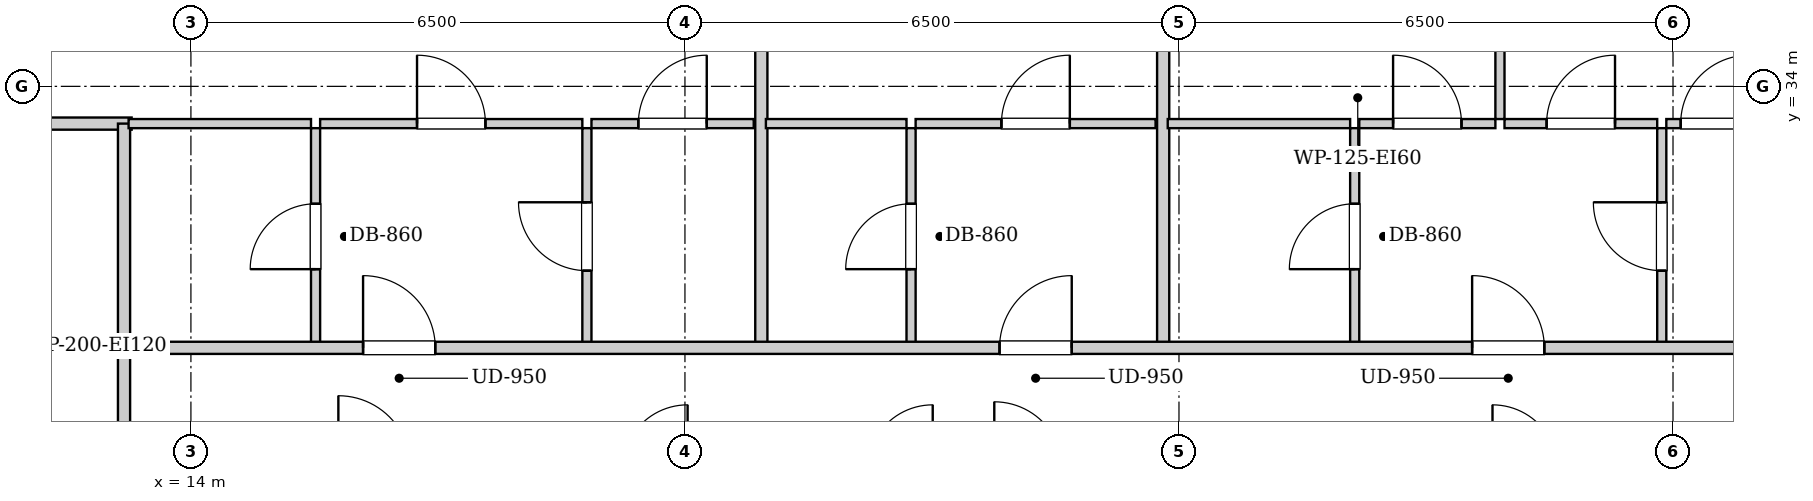
"""IFC4 building model, lengths in metres.
Left out: names, types, materials, properties, quantities, classifications, styles, units other than length and angle.
Written with IfcOpenShell. Run it as: python <this file> out.ifc"""

import sys

from ifc_helpers import new_model, si_unit, direction, frame, frame_2d, origin, place, context, subcontext, project, spatial, rectangle, extrude, element, fill, save


model = new_model("IFC4")
c1 = context("Model", 3, precision=1e-05, world=origin(), true_north=direction((0.0, 1.0)))
c2 = subcontext(c1, "Body", "Model", "MODEL_VIEW")
j1 = project(units=[si_unit("LENGTHUNIT", "METRE"), si_unit("PLANEANGLEUNIT", "RADIAN")], contexts=[c1])
p1 = place(None, origin())
s1 = spatial("IfcSite", under=j1, at=p1, CompositionType="ELEMENT")
p2 = place(p1, origin())
s2 = spatial("IfcBuilding", under=s1, at=p2, CompositionType="ELEMENT")
p3 = place(p2, frame((0.0, 0.0, 187.6)))
s3 = spatial("IfcBuildingStorey", under=s2, at=p3, CompositionType="ELEMENT", Elevation=187.6)
p4 = place(p3, frame((13.12, 28.98, 0.0), z_axis=(0.0, 0.0, 1.0), x_axis=(0.0, 1.0, 0.0)))
e1 = element("IfcWall", 1, at=p4, inside=s3, PredefinedType="PARTITIONING", context=c2, shape_type="SweptSolid", body=[
    extrude(rectangle(XDim=1.58, YDim=0.16, at=frame_2d((0.79, 0.0))), origin(), (0.0, 0.0, 1.0), 3.04),
])
p5 = place(p3, frame((10.88, 33.51, 0.0), z_axis=(0.0, 0.0, 1.0), x_axis=(1.0, 0.0, 0.0)))
e2 = element("IfcWall", 2, at=p5, inside=s3, PredefinedType="PARTITIONING", context=c2, shape_type="SweptSolid", body=[
    extrude(rectangle(XDim=2.34, YDim=0.16, at=frame_2d((1.17, 0.0))), origin(), (0.0, 0.0, 1.0), 3.04),
])
p6 = place(p3, frame((13.12, 30.6, 0.0), z_axis=(0.0, 0.0, 1.0), x_axis=(0.0, 1.0, 0.0)))
e3 = element("IfcWall", 3, at=p6, inside=s3, PredefinedType="PARTITIONING", context=c2, shape_type="SweptSolid", body=[
    extrude(rectangle(XDim=2.91, YDim=0.16, at=frame_2d((1.455, 0.0))), origin(), (0.0, 0.0, 1.0), 3.04),
])
p7 = place(p3, frame((15.64, 30.6, 0.0), z_axis=(0.0, 0.0, 1.0), x_axis=(0.0, 1.0, 0.0)))
e4 = element("IfcWall", 4, at=p7, inside=s3, PredefinedType="PARTITIONING", context=c2, shape_type="SweptSolid", body=[
    extrude(rectangle(XDim=2.85, YDim=0.12, at=frame_2d((1.425, 0.0))), origin(), (0.0, 0.0, 1.0), 3.04),
])
p8 = place(p7, frame((0.995, 0.0, 0.0)))
e5 = element("IfcOpeningElement", 5, at=p8, cuts=e4, PredefinedType="OPENING", context=c2, shape_type="SweptSolid", body=[
    extrude(rectangle(XDim=0.86, YDim=2.05, at=frame_2d((0.43, 1.025))), frame((0.0, 0.07, 0.0), z_axis=(0.0, -1.0, 0.0), x_axis=(1.0, 0.0, 0.0)), (0.0, 0.0, 1.0), 0.14),
])
p9 = place(p3, frame((13.18, 33.51, 0.0), z_axis=(0.0, 0.0, 1.0), x_axis=(1.0, 0.0, 0.0)))
e6 = element("IfcWall", 6, at=p9, inside=s3, PredefinedType="PARTITIONING", context=c2, shape_type="SweptSolid", body=[
    extrude(rectangle(XDim=2.4, YDim=0.12, at=frame_2d((1.2, 0.0))), origin(), (0.0, 0.0, 1.0), 3.04),
])
p10 = place(p3, frame((19.21, 30.6, 0.0), z_axis=(0.0, 0.0, 1.0), x_axis=(0.0, 1.0, 0.0)))
e7 = element("IfcWall", 7, at=p10, inside=s3, PredefinedType="PARTITIONING", context=c2, shape_type="SweptSolid", body=[
    extrude(rectangle(XDim=2.85, YDim=0.12, at=frame_2d((1.425, 0.0))), origin(), (0.0, 0.0, 1.0), 3.04),
])
p11 = place(p10, frame((0.975, 0.0, 0.0)))
e8 = element("IfcOpeningElement", 8, at=p11, cuts=e7, PredefinedType="OPENING", context=c2, shape_type="SweptSolid", body=[
    extrude(rectangle(XDim=0.9, YDim=2.05, at=frame_2d((0.45, 1.025))), frame((0.0, 0.07, 0.0), z_axis=(0.0, -1.0, 0.0), x_axis=(1.0, 0.0, 0.0)), (0.0, 0.0, 1.0), 0.14),
])
p12 = place(p3, frame((15.7, 33.51, 0.0), z_axis=(0.0, 0.0, 1.0), x_axis=(1.0, 0.0, 0.0)))
e9 = element("IfcWall", 9, at=p12, inside=s3, PredefinedType="PARTITIONING", context=c2, shape_type="SweptSolid", body=[
    extrude(rectangle(XDim=3.45, YDim=0.12, at=frame_2d((1.725, 0.0))), origin(), (0.0, 0.0, 1.0), 3.04),
])
p13 = place(p12, frame((1.275, 0.0, 0.0)))
e10 = element("IfcOpeningElement", 10, at=p13, cuts=e9, PredefinedType="OPENING", context=c2, shape_type="SweptSolid", body=[
    extrude(rectangle(XDim=0.9, YDim=2.05, at=frame_2d((0.45, 1.025))), frame((0.0, 0.07, 0.0), z_axis=(0.0, -1.0, 0.0), x_axis=(1.0, 0.0, 0.0)), (0.0, 0.0, 1.0), 0.14),
])
p14 = place(p3, frame((19.27, 33.51, 0.0), z_axis=(0.0, 0.0, 1.0), x_axis=(1.0, 0.0, 0.0)))
e11 = element("IfcWall", 11, at=p14, inside=s3, PredefinedType="PARTITIONING", context=c2, shape_type="SweptSolid", body=[
    extrude(rectangle(XDim=2.135, YDim=0.12, at=frame_2d((1.067, 0.0))), origin(), (0.0, 0.0, 1.0), 3.04),
])
p15 = place(p14, frame((0.617, 0.0, 0.0)))
e12 = element("IfcOpeningElement", 12, at=p15, cuts=e11, PredefinedType="OPENING", context=c2, shape_type="SweptSolid", body=[
    extrude(rectangle(XDim=0.9, YDim=2.05, at=frame_2d((0.45, 1.025))), frame((0.0, 0.07, 0.0), z_axis=(0.0, -1.0, 0.0), x_axis=(1.0, 0.0, 0.0)), (0.0, 0.0, 1.0), 0.14),
])
p16 = place(p3, frame((21.505, 30.6, 0.0), z_axis=(0.0, 0.0, 1.0), x_axis=(0.0, 1.0, 0.0)))
e13 = element("IfcWall", 13, at=p16, inside=s3, PredefinedType="PARTITIONING", context=c2, shape_type="SweptSolid", body=[
    extrude(rectangle(XDim=9.32, YDim=0.16, at=frame_2d((4.66, 0.0))), origin(), (0.0, 0.0, 1.0), 3.04),
])
p17 = place(p3, frame((23.475, 30.6, 0.0), z_axis=(0.0, 0.0, 1.0), x_axis=(0.0, 1.0, 0.0)))
e14 = element("IfcWall", 14, at=p17, inside=s3, PredefinedType="PARTITIONING", context=c2, shape_type="SweptSolid", body=[
    extrude(rectangle(XDim=2.85, YDim=0.12, at=frame_2d((1.425, 0.0))), origin(), (0.0, 0.0, 1.0), 3.04),
])
p18 = place(p17, frame((0.995, 0.0, 0.0)))
e15 = element("IfcOpeningElement", 15, at=p18, cuts=e14, PredefinedType="OPENING", context=c2, shape_type="SweptSolid", body=[
    extrude(rectangle(XDim=0.86, YDim=2.05, at=frame_2d((0.43, 1.025))), frame((0.0, 0.07, 0.0), z_axis=(0.0, -1.0, 0.0), x_axis=(1.0, 0.0, 0.0)), (0.0, 0.0, 1.0), 0.14),
])
p19 = place(p3, frame((21.565, 33.51, 0.0), z_axis=(0.0, 0.0, 1.0), x_axis=(1.0, 0.0, 0.0)))
e16 = element("IfcWall", 16, at=p19, inside=s3, PredefinedType="PARTITIONING", context=c2, shape_type="SweptSolid", body=[
    extrude(rectangle(XDim=1.85, YDim=0.12, at=frame_2d((0.925, 0.0))), origin(), (0.0, 0.0, 1.0), 3.04),
])
p20 = place(p3, frame((23.535, 33.51, 0.0), z_axis=(0.0, 0.0, 1.0), x_axis=(1.0, 0.0, 0.0)))
e17 = element("IfcWall", 17, at=p20, inside=s3, PredefinedType="PARTITIONING", context=c2, shape_type="SweptSolid", body=[
    extrude(rectangle(XDim=3.157, YDim=0.12, at=frame_2d((1.579, 0.0))), origin(), (0.0, 0.0, 1.0), 3.04),
])
p21 = place(p20, frame((1.129, 0.0, 0.0)))
e18 = element("IfcOpeningElement", 18, at=p21, cuts=e17, PredefinedType="OPENING", context=c2, shape_type="SweptSolid", body=[
    extrude(rectangle(XDim=0.9, YDim=2.05, at=frame_2d((0.45, 1.025))), frame((0.0, 0.07, 0.0), z_axis=(0.0, -1.0, 0.0), x_axis=(1.0, 0.0, 0.0)), (0.0, 0.0, 1.0), 0.14),
])
p22 = place(p3, frame((26.792, 30.6, 0.0), z_axis=(0.0, 0.0, 1.0), x_axis=(0.0, 1.0, 0.0)))
e19 = element("IfcWall", 19, at=p22, inside=s3, PredefinedType="PARTITIONING", context=c2, shape_type="SweptSolid", body=[
    extrude(rectangle(XDim=9.32, YDim=0.16, at=frame_2d((4.66, 0.0))), origin(), (0.0, 0.0, 1.0), 3.04),
])
p23 = place(p3, frame((29.312, 30.6, 0.0), z_axis=(0.0, 0.0, 1.0), x_axis=(0.0, 1.0, 0.0)))
e20 = element("IfcWall", 20, at=p23, inside=s3, PredefinedType="PARTITIONING", context=c2, shape_type="SweptSolid", body=[
    extrude(rectangle(XDim=2.85, YDim=0.12, at=frame_2d((1.425, 0.0))), origin(), (0.0, 0.0, 1.0), 3.04),
])
p24 = place(p23, frame((0.995, 0.0, 0.0)))
e21 = element("IfcOpeningElement", 21, at=p24, cuts=e20, PredefinedType="OPENING", context=c2, shape_type="SweptSolid", body=[
    extrude(rectangle(XDim=0.86, YDim=2.05, at=frame_2d((0.43, 1.025))), frame((0.0, 0.07, 0.0), z_axis=(0.0, -1.0, 0.0), x_axis=(1.0, 0.0, 0.0)), (0.0, 0.0, 1.0), 0.14),
])
p25 = place(p3, frame((26.852, 33.51, 0.0), z_axis=(0.0, 0.0, 1.0), x_axis=(1.0, 0.0, 0.0)))
e22 = element("IfcWall", 22, at=p25, inside=s3, PredefinedType="PARTITIONING", context=c2, shape_type="SweptSolid", body=[
    extrude(rectangle(XDim=2.4, YDim=0.12, at=frame_2d((1.2, 0.0))), origin(), (0.0, 0.0, 1.0), 3.04),
])
p26 = place(p3, frame((33.352, 30.6, 0.0), z_axis=(0.0, 0.0, 1.0), x_axis=(0.0, 1.0, 0.0)))
e23 = element("IfcWall", 23, at=p26, inside=s3, PredefinedType="PARTITIONING", context=c2, shape_type="SweptSolid", body=[
    extrude(rectangle(XDim=2.85, YDim=0.12, at=frame_2d((1.425, 0.0))), origin(), (0.0, 0.0, 1.0), 3.04),
])
p27 = place(p26, frame((0.975, 0.0, 0.0)))
e24 = element("IfcOpeningElement", 24, at=p27, cuts=e23, PredefinedType="OPENING", context=c2, shape_type="SweptSolid", body=[
    extrude(rectangle(XDim=0.9, YDim=2.05, at=frame_2d((0.45, 1.025))), frame((0.0, 0.07, 0.0), z_axis=(0.0, -1.0, 0.0), x_axis=(1.0, 0.0, 0.0)), (0.0, 0.0, 1.0), 0.14),
])
p28 = place(p3, frame((29.372, 33.51, 0.0), z_axis=(0.0, 0.0, 1.0), x_axis=(1.0, 0.0, 0.0)))
e25 = element("IfcWall", 25, at=p28, inside=s3, PredefinedType="PARTITIONING", context=c2, shape_type="SweptSolid", body=[
    extrude(rectangle(XDim=1.791, YDim=0.12, at=frame_2d((0.896, 0.0))), origin(), (0.0, 0.0, 1.0), 3.04),
])
p29 = place(p28, frame((0.445, 0.0, 0.0)))
e26 = element("IfcOpeningElement", 26, at=p29, cuts=e25, PredefinedType="OPENING", context=c2, shape_type="SweptSolid", body=[
    extrude(rectangle(XDim=0.9, YDim=2.05, at=frame_2d((0.45, 1.025))), frame((0.0, 0.07, 0.0), z_axis=(0.0, -1.0, 0.0), x_axis=(1.0, 0.0, 0.0)), (0.0, 0.0, 1.0), 0.14),
])
p30 = place(p3, frame((31.283, 33.51, 0.0), z_axis=(0.0, 0.0, 1.0), x_axis=(1.0, 0.0, 0.0)))
e27 = element("IfcWall", 27, at=p30, inside=s3, PredefinedType="PARTITIONING", context=c2, shape_type="SweptSolid", body=[
    extrude(rectangle(XDim=2.009, YDim=0.12, at=frame_2d((1.004, 0.0))), origin(), (0.0, 0.0, 1.0), 3.04),
])
p31 = place(p30, frame((0.554, 0.0, 0.0)))
e28 = element("IfcOpeningElement", 28, at=p31, cuts=e27, PredefinedType="OPENING", context=c2, shape_type="SweptSolid", body=[
    extrude(rectangle(XDim=0.9, YDim=2.05, at=frame_2d((0.45, 1.025))), frame((0.0, 0.07, 0.0), z_axis=(0.0, -1.0, 0.0), x_axis=(1.0, 0.0, 0.0)), (0.0, 0.0, 1.0), 0.14),
])
p32 = place(p3, frame((33.412, 33.51, 0.0), z_axis=(0.0, 0.0, 1.0), x_axis=(1.0, 0.0, 0.0)))
e29 = element("IfcWall", 29, at=p32, inside=s3, PredefinedType="PARTITIONING", context=c2, shape_type="SweptSolid", body=[
    extrude(rectangle(XDim=1.278, YDim=0.12, at=frame_2d((0.639, 0.0))), origin(), (0.0, 0.0, 1.0), 3.04),
])
p33 = place(p32, frame((0.189, 0.0, 0.0)))
e30 = element("IfcOpeningElement", 30, at=p33, cuts=e29, PredefinedType="OPENING", context=c2, shape_type="SweptSolid", body=[
    extrude(rectangle(XDim=0.9, YDim=2.05, at=frame_2d((0.45, 1.025))), frame((0.0, 0.07, 0.0), z_axis=(0.0, -1.0, 0.0), x_axis=(1.0, 0.0, 0.0)), (0.0, 0.0, 1.0), 0.14),
])
p34 = place(p3, frame((31.223, 33.57, 0.0), z_axis=(0.0, 0.0, 1.0), x_axis=(0.0, 1.0, 0.0)))
e31 = element("IfcWall", 31, at=p34, inside=s3, PredefinedType="PARTITIONING", context=c2, shape_type="SweptSolid", body=[
    extrude(rectangle(XDim=4.2, YDim=0.12, at=frame_2d((2.1, 0.0))), origin(), (0.0, 0.0, 1.0), 3.04),
])
p35 = place(p34, frame((1.65, 0.0, 0.0)))
e32 = element("IfcOpeningElement", 32, at=p35, cuts=e31, PredefinedType="OPENING", context=c2, shape_type="SweptSolid", body=[
    extrude(rectangle(XDim=0.9, YDim=2.05, at=frame_2d((0.45, 1.025))), frame((0.0, 0.07, 0.0), z_axis=(0.0, -1.0, 0.0), x_axis=(1.0, 0.0, 0.0)), (0.0, 0.0, 1.0), 0.14),
])
p36 = place(p3, frame((13.15, 30.56, 0.0), z_axis=(0.0, 0.0, 1.0), x_axis=(1.0, 0.0, 0.0)))
e33 = element("IfcWall", 33, at=p36, inside=s3, PredefinedType="PARTITIONING", context=c2, shape_type="SweptSolid", body=[
    extrude(rectangle(XDim=24.6, YDim=0.16, at=frame_2d((12.3, 0.0))), origin(), (0.0, 0.0, 1.0), 3.04),
])
p37 = place(p36, frame((3.115, 0.0, 0.0)))
e34 = element("IfcOpeningElement", 34, at=p37, cuts=e33, PredefinedType="OPENING", context=c2, shape_type="SweptSolid", body=[
    extrude(rectangle(XDim=0.95, YDim=2.1, at=frame_2d((0.475, 1.05))), frame((0.0, 0.09, 0.0), z_axis=(0.0, -1.0, 0.0), x_axis=(1.0, 0.0, 0.0)), (0.0, 0.0, 1.0), 0.18),
])
p38 = place(p36, frame((11.489, 0.0, 0.0)))
e35 = element("IfcOpeningElement", 35, at=p38, cuts=e33, PredefinedType="OPENING", context=c2, shape_type="SweptSolid", body=[
    extrude(rectangle(XDim=0.95, YDim=2.1, at=frame_2d((0.475, 1.05))), frame((0.0, 0.09, 0.0), z_axis=(0.0, -1.0, 0.0), x_axis=(1.0, 0.0, 0.0)), (0.0, 0.0, 1.0), 0.18),
])
p39 = place(p36, frame((17.707, 0.0, 0.0)))
e36 = element("IfcOpeningElement", 36, at=p39, cuts=e33, PredefinedType="OPENING", context=c2, shape_type="SweptSolid", body=[
    extrude(rectangle(XDim=0.95, YDim=2.1, at=frame_2d((0.475, 1.05))), frame((0.0, 0.09, 0.0), z_axis=(0.0, -1.0, 0.0), x_axis=(1.0, 0.0, 0.0)), (0.0, 0.0, 1.0), 0.18),
])
p40 = place(p8, origin())
e37 = element("IfcDoor", 37, at=p40, inside=s3, OperationType="SINGLE_SWING_LEFT", PredefinedType="DOOR", context=c2, shape_type="SweptSolid", body=[
    extrude(rectangle(XDim=0.86, YDim=2.05, at=frame_2d((0.43, 1.025))), frame((0.0, 0.025, 0.0), z_axis=(0.0, -1.0, 0.0), x_axis=(1.0, 0.0, 0.0)), (0.0, 0.0, 1.0), 0.05),
])
fill(e5, e37)
p41 = place(p11, origin())
e38 = element("IfcDoor", 38, at=p41, inside=s3, OperationType="SINGLE_SWING_RIGHT", PredefinedType="DOOR", context=c2, shape_type="SweptSolid", body=[
    extrude(rectangle(XDim=0.9, YDim=2.05, at=frame_2d((0.45, 1.025))), frame((0.0, 0.025, 0.0), z_axis=(0.0, -1.0, 0.0), x_axis=(1.0, 0.0, 0.0)), (0.0, 0.0, 1.0), 0.05),
])
fill(e8, e38)
p42 = place(p13, origin())
e39 = element("IfcDoor", 39, at=p42, inside=s3, OperationType="SINGLE_SWING_LEFT", PredefinedType="DOOR", context=c2, shape_type="SweptSolid", body=[
    extrude(rectangle(XDim=0.9, YDim=2.05, at=frame_2d((0.45, 1.025))), frame((0.0, 0.025, 0.0), z_axis=(0.0, -1.0, 0.0), x_axis=(1.0, 0.0, 0.0)), (0.0, 0.0, 1.0), 0.05),
])
fill(e10, e39)
p43 = place(p15, origin())
e40 = element("IfcDoor", 40, at=p43, inside=s3, OperationType="SINGLE_SWING_RIGHT", PredefinedType="DOOR", context=c2, shape_type="SweptSolid", body=[
    extrude(rectangle(XDim=0.9, YDim=2.05, at=frame_2d((0.45, 1.025))), frame((0.0, 0.025, 0.0), z_axis=(0.0, -1.0, 0.0), x_axis=(1.0, 0.0, 0.0)), (0.0, 0.0, 1.0), 0.05),
])
fill(e12, e40)
p44 = place(p18, origin())
e41 = element("IfcDoor", 41, at=p44, inside=s3, OperationType="SINGLE_SWING_LEFT", PredefinedType="DOOR", context=c2, shape_type="SweptSolid", body=[
    extrude(rectangle(XDim=0.86, YDim=2.05, at=frame_2d((0.43, 1.025))), frame((0.0, 0.025, 0.0), z_axis=(0.0, -1.0, 0.0), x_axis=(1.0, 0.0, 0.0)), (0.0, 0.0, 1.0), 0.05),
])
fill(e15, e41)
p45 = place(p21, origin())
e42 = element("IfcDoor", 42, at=p45, inside=s3, OperationType="SINGLE_SWING_RIGHT", PredefinedType="DOOR", context=c2, shape_type="SweptSolid", body=[
    extrude(rectangle(XDim=0.9, YDim=2.05, at=frame_2d((0.45, 1.025))), frame((0.0, 0.025, 0.0), z_axis=(0.0, -1.0, 0.0), x_axis=(1.0, 0.0, 0.0)), (0.0, 0.0, 1.0), 0.05),
])
fill(e18, e42)
p46 = place(p24, origin())
e43 = element("IfcDoor", 43, at=p46, inside=s3, OperationType="SINGLE_SWING_LEFT", PredefinedType="DOOR", context=c2, shape_type="SweptSolid", body=[
    extrude(rectangle(XDim=0.86, YDim=2.05, at=frame_2d((0.43, 1.025))), frame((0.0, 0.025, 0.0), z_axis=(0.0, -1.0, 0.0), x_axis=(1.0, 0.0, 0.0)), (0.0, 0.0, 1.0), 0.05),
])
fill(e21, e43)
p47 = place(p27, origin())
e44 = element("IfcDoor", 44, at=p47, inside=s3, OperationType="SINGLE_SWING_RIGHT", PredefinedType="DOOR", context=c2, shape_type="SweptSolid", body=[
    extrude(rectangle(XDim=0.9, YDim=2.05, at=frame_2d((0.45, 1.025))), frame((0.0, 0.025, 0.0), z_axis=(0.0, -1.0, 0.0), x_axis=(1.0, 0.0, 0.0)), (0.0, 0.0, 1.0), 0.05),
])
fill(e24, e44)
p48 = place(p29, origin())
e45 = element("IfcDoor", 45, at=p48, inside=s3, OperationType="SINGLE_SWING_LEFT", PredefinedType="DOOR", context=c2, shape_type="SweptSolid", body=[
    extrude(rectangle(XDim=0.9, YDim=2.05, at=frame_2d((0.45, 1.025))), frame((0.0, 0.025, 0.0), z_axis=(0.0, -1.0, 0.0), x_axis=(1.0, 0.0, 0.0)), (0.0, 0.0, 1.0), 0.05),
])
fill(e26, e45)
p49 = place(p31, origin())
e46 = element("IfcDoor", 46, at=p49, inside=s3, OperationType="SINGLE_SWING_RIGHT", PredefinedType="DOOR", context=c2, shape_type="SweptSolid", body=[
    extrude(rectangle(XDim=0.9, YDim=2.05, at=frame_2d((0.45, 1.025))), frame((0.0, 0.025, 0.0), z_axis=(0.0, -1.0, 0.0), x_axis=(1.0, 0.0, 0.0)), (0.0, 0.0, 1.0), 0.05),
])
fill(e28, e46)
p50 = place(p33, origin())
e47 = element("IfcDoor", 47, at=p50, inside=s3, OperationType="SINGLE_SWING_RIGHT", PredefinedType="DOOR", context=c2, shape_type="SweptSolid", body=[
    extrude(rectangle(XDim=0.9, YDim=2.05, at=frame_2d((0.45, 1.025))), frame((0.0, 0.025, 0.0), z_axis=(0.0, -1.0, 0.0), x_axis=(1.0, 0.0, 0.0)), (0.0, 0.0, 1.0), 0.05),
])
fill(e30, e47)
p51 = place(p37, origin())
e48 = element("IfcDoor", 48, at=p51, inside=s3, OperationType="SINGLE_SWING_LEFT", PredefinedType="DOOR", context=c2, shape_type="SweptSolid", body=[
    extrude(rectangle(XDim=0.95, YDim=2.1, at=frame_2d((0.475, 1.05))), frame((0.0, 0.025, 0.0), z_axis=(0.0, -1.0, 0.0), x_axis=(1.0, 0.0, 0.0)), (0.0, 0.0, 1.0), 0.05),
])
fill(e34, e48)
p52 = place(p38, origin())
e49 = element("IfcDoor", 49, at=p52, inside=s3, OperationType="SINGLE_SWING_RIGHT", PredefinedType="DOOR", context=c2, shape_type="SweptSolid", body=[
    extrude(rectangle(XDim=0.95, YDim=2.1, at=frame_2d((0.475, 1.05))), frame((0.0, 0.025, 0.0), z_axis=(0.0, -1.0, 0.0), x_axis=(1.0, 0.0, 0.0)), (0.0, 0.0, 1.0), 0.05),
])
fill(e35, e49)
p53 = place(p39, origin())
e50 = element("IfcDoor", 50, at=p53, inside=s3, OperationType="SINGLE_SWING_LEFT", PredefinedType="DOOR", context=c2, shape_type="SweptSolid", body=[
    extrude(rectangle(XDim=0.95, YDim=2.1, at=frame_2d((0.475, 1.05))), frame((0.0, 0.025, 0.0), z_axis=(0.0, -1.0, 0.0), x_axis=(1.0, 0.0, 0.0)), (0.0, 0.0, 1.0), 0.05),
])
fill(e36, e50)
save(model, sys.argv[1])
